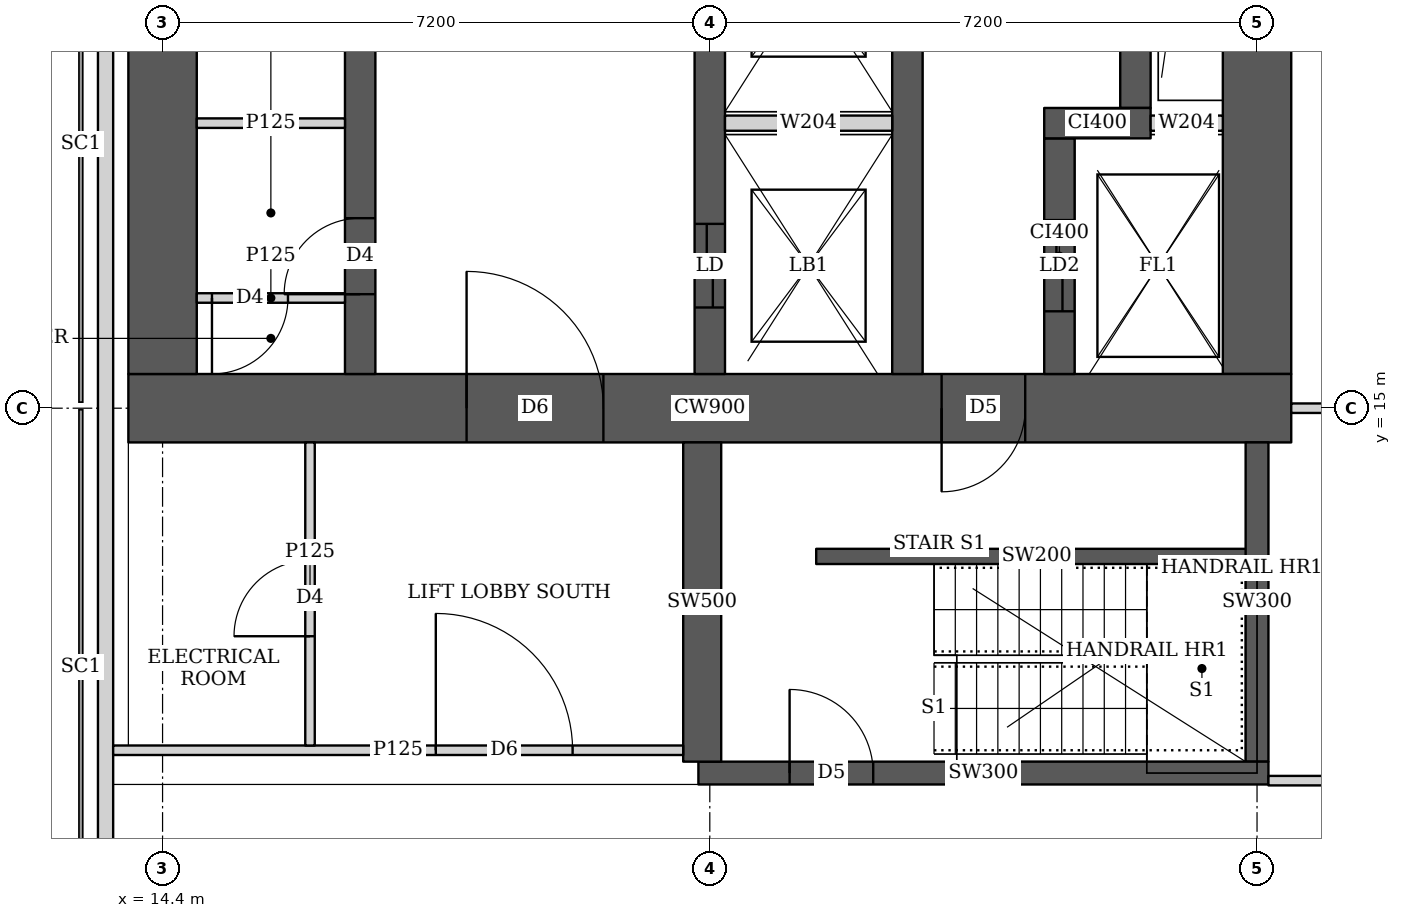
"""IFC4 building model, lengths in metres.
Left out: names, types, materials, properties, quantities, classifications, styles, units other than length and angle.
Written with IfcOpenShell. Run it as: python <this file> out.ifc"""

import sys

from ifc_helpers import new_model, si_unit, direction, frame, frame_2d, origin, place, context, subcontext, project, spatial, rectangle, extrude, element, fill, save


model = new_model("IFC4")
c1 = context("Model", 3, precision=1e-05, world=origin(), true_north=direction((0.0, 1.0)))
c2 = subcontext(c1, "Body", "Model", "MODEL_VIEW")
j1 = project(units=[si_unit("LENGTHUNIT", "METRE"), si_unit("PLANEANGLEUNIT", "RADIAN")], contexts=[c1])
p1 = place(None, origin())
s1 = spatial("IfcSite", under=j1, at=p1, CompositionType="ELEMENT")
p2 = place(p1, origin())
s2 = spatial("IfcBuilding", under=s1, at=p2, CompositionType="ELEMENT")
p3 = place(p2, frame((0.0, 0.0, 270.35)))
s3 = spatial("IfcBuildingStorey", under=s2, at=p3, CompositionType="ELEMENT", Elevation=270.35)
p4 = place(p3, frame((13.95, 15.0, 0.0), z_axis=(0.0, 0.0, 1.0), x_axis=(1.0, 0.0, 0.0)))
e1 = element("IfcWall", 1, at=p4, inside=s3, PredefinedType="SHEAR", context=c2, shape_type="SweptSolid", body=[
    extrude(rectangle(XDim=15.3, YDim=0.9, at=frame_2d((7.65, 0.0))), origin(), (0.0, 0.0, 1.0), 3.75),
])
p5 = place(p4, frame((4.45, 0.0, 0.0)))
e2 = element("IfcOpeningElement", 2, at=p5, cuts=e1, PredefinedType="OPENING", context=c2, shape_type="SweptSolid", body=[
    extrude(rectangle(XDim=1.8, YDim=2.1, at=frame_2d((0.9, 1.05))), frame((0.0, 0.46, 0.0), z_axis=(0.0, -1.0, 0.0), x_axis=(1.0, 0.0, 0.0)), (0.0, 0.0, 1.0), 0.92),
])
p6 = place(p4, frame((10.7, 0.0, 0.0)))
e3 = element("IfcOpeningElement", 3, at=p6, cuts=e1, PredefinedType="OPENING", context=c2, shape_type="SweptSolid", body=[
    extrude(rectangle(XDim=1.1, YDim=2.1, at=frame_2d((0.55, 1.05))), frame((0.0, 0.46, 0.0), z_axis=(0.0, -1.0, 0.0), x_axis=(1.0, 0.0, 0.0)), (0.0, 0.0, 1.0), 0.92),
])
for number, where, z_axis, x_axis in (
    (4, (14.4, 15.45, 0.0), (0.0, 0.0, 1.0), (0.0, 1.0, 0.0)),
    (5, (28.8, 15.45, 0.0), (0.0, 0.0, 1.0), (0.0, 1.0, 0.0)),
):
    element("IfcWall", number, at=place(p3, frame(where, z_axis=z_axis, x_axis=x_axis)), inside=s3, PredefinedType="SHEAR", context=c2, shape_type="SweptSolid", body=[
        extrude(rectangle(XDim=14.1, YDim=0.9, at=frame_2d((7.05, 0.0))), origin(), (0.0, 0.0, 1.0), 3.75),
    ])
p7 = place(p3, frame((17.0, 15.45, 0.0), z_axis=(0.0, 0.0, 1.0), x_axis=(0.0, 1.0, 0.0)))
e6 = element("IfcWall", 6, at=p7, inside=s3, PredefinedType="SHEAR", context=c2, shape_type="SweptSolid", body=[
    extrude(rectangle(XDim=14.1, YDim=0.4, at=frame_2d((7.05, 0.0))), origin(), (0.0, 0.0, 1.0), 3.75),
])
p8 = place(p7, frame((1.05, 0.0, 0.0)))
e7 = element("IfcOpeningElement", 7, at=p8, cuts=e6, PredefinedType="OPENING", context=c2, shape_type="SweptSolid", body=[
    extrude(rectangle(XDim=1.0, YDim=2.1, at=frame_2d((0.5, 1.05))), frame((0.0, 0.21, 0.0), z_axis=(0.0, -1.0, 0.0), x_axis=(1.0, 0.0, 0.0)), (0.0, 0.0, 1.0), 0.42),
])
p9 = place(p7, frame((4.675, 0.0, 0.0)))
e8 = element("IfcOpeningElement", 8, at=p9, cuts=e6, PredefinedType="OPENING", context=c2, shape_type="SweptSolid", body=[
    extrude(rectangle(XDim=1.0, YDim=2.1, at=frame_2d((0.5, 1.05))), frame((0.0, 0.21, 0.0), z_axis=(0.0, -1.0, 0.0), x_axis=(1.0, 0.0, 0.0)), (0.0, 0.0, 1.0), 0.42),
])
p10 = place(p7, frame((8.425, 0.0, 0.0)))
e9 = element("IfcOpeningElement", 9, at=p10, cuts=e6, PredefinedType="OPENING", context=c2, shape_type="SweptSolid", body=[
    extrude(rectangle(XDim=1.0, YDim=2.1, at=frame_2d((0.5, 1.05))), frame((0.0, 0.21, 0.0), z_axis=(0.0, -1.0, 0.0), x_axis=(1.0, 0.0, 0.0)), (0.0, 0.0, 1.0), 0.42),
])
p11 = place(p7, frame((12.175, 0.0, 0.0)))
e10 = element("IfcOpeningElement", 10, at=p11, cuts=e6, PredefinedType="OPENING", context=c2, shape_type="SweptSolid", body=[
    extrude(rectangle(XDim=1.0, YDim=2.1, at=frame_2d((0.5, 1.05))), frame((0.0, 0.21, 0.0), z_axis=(0.0, -1.0, 0.0), x_axis=(1.0, 0.0, 0.0)), (0.0, 0.0, 1.0), 0.42),
])
p12 = place(p3, frame((21.6, 15.45, 0.0), z_axis=(0.0, 0.0, 1.0), x_axis=(0.0, 1.0, 0.0)))
e11 = element("IfcWall", 11, at=p12, inside=s3, PredefinedType="SHEAR", context=c2, shape_type="SweptSolid", body=[
    extrude(rectangle(XDim=14.1, YDim=0.4, at=frame_2d((7.05, 0.0))), origin(), (0.0, 0.0, 1.0), 3.75),
])
p13 = place(p12, frame((0.875, 0.0, 0.0)))
e12 = element("IfcOpeningElement", 12, at=p13, cuts=e11, PredefinedType="OPENING", context=c2, shape_type="SweptSolid", body=[
    extrude(rectangle(XDim=1.1, YDim=2.1, at=frame_2d((0.55, 1.05))), frame((0.0, 0.21, 0.0), z_axis=(0.0, -1.0, 0.0), x_axis=(1.0, 0.0, 0.0)), (0.0, 0.0, 1.0), 0.42),
])
p14 = place(p12, frame((4.625, 0.0, 0.0)))
e13 = element("IfcOpeningElement", 13, at=p14, cuts=e11, PredefinedType="OPENING", context=c2, shape_type="SweptSolid", body=[
    extrude(rectangle(XDim=1.1, YDim=2.1, at=frame_2d((0.55, 1.05))), frame((0.0, 0.21, 0.0), z_axis=(0.0, -1.0, 0.0), x_axis=(1.0, 0.0, 0.0)), (0.0, 0.0, 1.0), 0.42),
])
p15 = place(p12, frame((8.375, 0.0, 0.0)))
e14 = element("IfcOpeningElement", 14, at=p15, cuts=e11, PredefinedType="OPENING", context=c2, shape_type="SweptSolid", body=[
    extrude(rectangle(XDim=1.1, YDim=2.1, at=frame_2d((0.55, 1.05))), frame((0.0, 0.21, 0.0), z_axis=(0.0, -1.0, 0.0), x_axis=(1.0, 0.0, 0.0)), (0.0, 0.0, 1.0), 0.42),
])
p16 = place(p12, frame((12.125, 0.0, 0.0)))
e15 = element("IfcOpeningElement", 15, at=p16, cuts=e11, PredefinedType="OPENING", context=c2, shape_type="SweptSolid", body=[
    extrude(rectangle(XDim=1.1, YDim=2.1, at=frame_2d((0.55, 1.05))), frame((0.0, 0.21, 0.0), z_axis=(0.0, -1.0, 0.0), x_axis=(1.0, 0.0, 0.0)), (0.0, 0.0, 1.0), 0.42),
])
p17 = place(p3, frame((24.2, 15.45, 0.0), z_axis=(0.0, 0.0, 1.0), x_axis=(0.0, 1.0, 0.0)))
e16 = element("IfcWall", 16, at=p17, inside=s3, PredefinedType="SHEAR", context=c2, shape_type="SweptSolid", body=[
    extrude(rectangle(XDim=14.1, YDim=0.4, at=frame_2d((7.05, 0.0))), origin(), (0.0, 0.0, 1.0), 3.75),
])
p18 = place(p3, frame((26.2, 15.45, 0.0), z_axis=(0.0, 0.0, 1.0), x_axis=(0.0, 1.0, 0.0)))
e17 = element("IfcWall", 17, at=p18, inside=s3, PredefinedType="SHEAR", context=c2, shape_type="SweptSolid", body=[
    extrude(rectangle(XDim=3.1, YDim=0.4, at=frame_2d((1.55, 0.0))), origin(), (0.0, 0.0, 1.0), 3.75),
])
p19 = place(p18, frame((0.825, 0.0, 0.0)))
e18 = element("IfcOpeningElement", 18, at=p19, cuts=e17, PredefinedType="OPENING", context=c2, shape_type="SweptSolid", body=[
    extrude(rectangle(XDim=1.2, YDim=2.1, at=frame_2d((0.6, 1.05))), frame((0.0, 0.21, 0.0), z_axis=(0.0, -1.0, 0.0), x_axis=(1.0, 0.0, 0.0)), (0.0, 0.0, 1.0), 0.42),
])
p20 = place(p3, frame((26.0, 18.75, 0.0), z_axis=(0.0, 0.0, 1.0), x_axis=(1.0, 0.0, 0.0)))
e19 = element("IfcWall", 19, at=p20, inside=s3, PredefinedType="SHEAR", context=c2, shape_type="SweptSolid", body=[
    extrude(rectangle(XDim=1.4, YDim=0.4, at=frame_2d((0.7, 0.0))), origin(), (0.0, 0.0, 1.0), 3.75),
])
p21 = place(p3, frame((27.2, 18.95, 0.0), z_axis=(0.0, 0.0, 1.0), x_axis=(0.0, 1.0, 0.0)))
e20 = element("IfcWall", 20, at=p21, inside=s3, PredefinedType="SHEAR", context=c2, shape_type="SweptSolid", body=[
    extrude(rectangle(XDim=7.1, YDim=0.4, at=frame_2d((3.55, 0.0))), origin(), (0.0, 0.0, 1.0), 3.75),
])
p22 = place(p3, frame((21.45, 10.2, 0.0), z_axis=(0.0, 0.0, 1.0), x_axis=(1.0, 0.0, 0.0)))
e21 = element("IfcWall", 21, at=p22, inside=s3, PredefinedType="SHEAR", context=c2, shape_type="SweptSolid", body=[
    extrude(rectangle(XDim=7.5, YDim=0.3, at=frame_2d((3.75, 0.0))), origin(), (0.0, 0.0, 1.0), 3.75),
])
p23 = place(p22, frame((1.2, 0.0, 0.0)))
e22 = element("IfcOpeningElement", 22, at=p23, cuts=e21, PredefinedType="OPENING", context=c2, shape_type="SweptSolid", body=[
    extrude(rectangle(XDim=1.1, YDim=2.1, at=frame_2d((0.55, 1.05))), frame((0.0, 0.16, 0.0), z_axis=(0.0, -1.0, 0.0), x_axis=(1.0, 0.0, 0.0)), (0.0, 0.0, 1.0), 0.32),
])
p24 = place(p3, frame((21.5, 10.35, 0.0), z_axis=(0.0, 0.0, 1.0), x_axis=(0.0, 1.0, 0.0)))
e23 = element("IfcWall", 23, at=p24, inside=s3, PredefinedType="SHEAR", context=c2, shape_type="SweptSolid", body=[
    extrude(rectangle(XDim=4.2, YDim=0.5, at=frame_2d((2.1, 0.0))), origin(), (0.0, 0.0, 1.0), 3.75),
])
p25 = place(p3, frame((28.8, 10.35, 0.0), z_axis=(0.0, 0.0, 1.0), x_axis=(0.0, 1.0, 0.0)))
e24 = element("IfcWall", 24, at=p25, inside=s3, PredefinedType="SHEAR", context=c2, shape_type="SweptSolid", body=[
    extrude(rectangle(XDim=4.2, YDim=0.3, at=frame_2d((2.1, 0.0))), origin(), (0.0, 0.0, 1.0), 3.75),
])
p26 = place(p3, frame((13.65, 43.037, 0.0), z_axis=(0.0, 0.0, 1.0), x_axis=(0.0, -1.0, 0.0)))
e25 = element("IfcWall", 25, at=p26, inside=s3, PredefinedType="SOLIDWALL", context=c2, shape_type="SweptSolid", body=[
    extrude(rectangle(XDim=35.374, YDim=0.2, at=frame_2d((17.687, 0.0))), origin(), (0.0, 0.0, 1.0), 3.5),
])
p27 = place(p26, frame((1.959, 0.0, 0.9)))
e26 = element("IfcOpeningElement", 26, at=p27, cuts=e25, PredefinedType="OPENING", context=c2, shape_type="SweptSolid", body=[
    extrude(rectangle(XDim=1.8, YDim=1.5, at=frame_2d((0.9, 0.75))), frame((0.0, 0.11, 0.0), z_axis=(0.0, -1.0, 0.0), x_axis=(1.0, 0.0, 0.0)), (0.0, 0.0, 1.0), 0.22),
])
p28 = place(p3, frame((13.75, 10.5, 0.0), z_axis=(0.0, 0.0, 1.0), x_axis=(1.0, 0.0, 0.0)))
e27 = element("IfcWall", 27, at=p28, inside=s3, PredefinedType="PARTITIONING", context=c2, shape_type="SweptSolid", body=[
    extrude(rectangle(XDim=7.5, YDim=0.125, at=frame_2d((3.75, 0.0))), origin(), (0.0, 0.0, 1.0), 3.5),
])
p29 = place(p28, frame((4.245, 0.0, 0.0)))
e28 = element("IfcOpeningElement", 28, at=p29, cuts=e27, PredefinedType="OPENING", context=c2, shape_type="SweptSolid", body=[
    extrude(rectangle(XDim=1.8, YDim=2.1, at=frame_2d((0.9, 1.05))), frame((0.0, 0.073, 0.0), z_axis=(0.0, -1.0, 0.0), x_axis=(1.0, 0.0, 0.0)), (0.0, 0.0, 1.0), 0.145),
])
p30 = place(p3, frame((16.34, 10.562, 0.0), z_axis=(0.0, 0.0, 1.0), x_axis=(0.0, 1.0, 0.0)))
e29 = element("IfcWall", 29, at=p30, inside=s3, PredefinedType="PARTITIONING", context=c2, shape_type="SweptSolid", body=[
    extrude(rectangle(XDim=3.988, YDim=0.125, at=frame_2d((1.994, 0.0))), origin(), (0.0, 0.0, 1.0), 3.5),
])
p31 = place(p30, frame((1.438, 0.0, 0.0)))
e30 = element("IfcOpeningElement", 30, at=p31, cuts=e29, PredefinedType="OPENING", context=c2, shape_type="SweptSolid", body=[
    extrude(rectangle(XDim=1.0, YDim=2.1, at=frame_2d((0.5, 1.05))), frame((0.0, 0.073, 0.0), z_axis=(0.0, -1.0, 0.0), x_axis=(1.0, 0.0, 0.0)), (0.0, 0.0, 1.0), 0.145),
])
p32 = place(p3, frame((28.95, 10.1, 0.0), z_axis=(0.0, 0.0, 1.0), x_axis=(1.0, 0.0, 0.0)))
e31 = element("IfcWall", 31, at=p32, inside=s3, PredefinedType="PARTITIONING", context=c2, shape_type="SweptSolid", body=[
    extrude(rectangle(XDim=9.188, YDim=0.125, at=frame_2d((4.594, 0.0))), origin(), (0.0, 0.0, 1.0), 3.5),
])
p33 = place(p3, frame((29.25, 15.0, 0.0), z_axis=(0.0, 0.0, 1.0), x_axis=(1.0, 0.0, 0.0)))
e32 = element("IfcWall", 32, at=p33, inside=s3, PredefinedType="PARTITIONING", context=c2, shape_type="SweptSolid", body=[
    extrude(rectangle(XDim=6.049, YDim=0.125, at=frame_2d((3.024, 0.0))), origin(), (0.0, 0.0, 1.0), 3.5),
])
p34 = place(p3, frame((14.85, 16.45, 0.0), z_axis=(0.0, 0.0, 1.0), x_axis=(1.0, 0.0, 0.0)))
e33 = element("IfcWall", 33, at=p34, inside=s3, PredefinedType="PARTITIONING", context=c2, shape_type="SweptSolid", body=[
    extrude(rectangle(XDim=1.95, YDim=0.125, at=frame_2d((0.975, 0.0))), origin(), (0.0, 0.0, 1.0), 3.5),
])
p35 = place(p34, frame((0.2, 0.0, 0.0)))
e34 = element("IfcOpeningElement", 34, at=p35, cuts=e33, PredefinedType="OPENING", context=c2, shape_type="SweptSolid", body=[
    extrude(rectangle(XDim=1.0, YDim=2.1, at=frame_2d((0.5, 1.05))), frame((0.0, 0.073, 0.0), z_axis=(0.0, -1.0, 0.0), x_axis=(1.0, 0.0, 0.0)), (0.0, 0.0, 1.0), 0.145),
])
p36 = place(p3, frame((14.85, 18.75, 0.0), z_axis=(0.0, 0.0, 1.0), x_axis=(1.0, 0.0, 0.0)))
e35 = element("IfcWall", 35, at=p36, inside=s3, PredefinedType="PARTITIONING", context=c2, shape_type="SweptSolid", body=[
    extrude(rectangle(XDim=1.95, YDim=0.125, at=frame_2d((0.975, 0.0))), origin(), (0.0, 0.0, 1.0), 3.5),
])
p37 = place(p3, frame((23.0, 13.05, 0.0), z_axis=(0.0, 0.0, 1.0), x_axis=(1.0, 0.0, 0.0)))
e36 = element("IfcWall", 36, at=p37, inside=s3, PredefinedType="SHEAR", context=c2, shape_type="SweptSolid", body=[
    extrude(rectangle(XDim=5.8, YDim=0.2, at=frame_2d((2.9, 0.0))), origin(), (0.0, 0.0, 1.0), 3.75),
])
p38 = place(p3, frame((21.8, 18.75, 0.0), z_axis=(0.0, 0.0, 1.0), x_axis=(1.0, 0.0, 0.0)))
e37 = element("IfcWall", 37, at=p38, inside=s3, PredefinedType="SOLIDWALL", context=c2, shape_type="SweptSolid", body=[
    extrude(rectangle(XDim=2.2, YDim=0.2, at=frame_2d((1.1, 0.0))), origin(), (0.0, 0.0, 1.0), 3.5),
])
p39 = place(p3, frame((27.4, 18.75, 0.0), z_axis=(0.0, 0.0, 1.0), x_axis=(1.0, 0.0, 0.0)))
e38 = element("IfcWall", 38, at=p39, inside=s3, PredefinedType="SOLIDWALL", context=c2, shape_type="SweptSolid", body=[
    extrude(rectangle(XDim=0.95, YDim=0.2, at=frame_2d((0.475, 0.0))), origin(), (0.0, 0.0, 1.0), 3.5),
])
p40 = place(p31, origin())
e39 = element("IfcDoor", 39, at=p40, inside=s3, OperationType="SINGLE_SWING_LEFT", PredefinedType="DOOR", context=c2, shape_type="SweptSolid", body=[
    extrude(rectangle(XDim=1.0, YDim=2.1, at=frame_2d((0.5, 1.05))), frame((0.0, 0.025, 0.0), z_axis=(0.0, -1.0, 0.0), x_axis=(1.0, 0.0, 0.0)), (0.0, 0.0, 1.0), 0.05),
])
fill(e30, e39)
p41 = place(p29, origin())
e40 = element("IfcDoor", 40, at=p41, inside=s3, OperationType="DOUBLE_DOOR_SINGLE_SWING", PredefinedType="DOOR", context=c2, shape_type="SweptSolid", body=[
    extrude(rectangle(XDim=1.8, YDim=2.1, at=frame_2d((0.9, 1.05))), frame((0.0, 0.025, 0.0), z_axis=(0.0, -1.0, 0.0), x_axis=(1.0, 0.0, 0.0)), (0.0, 0.0, 1.0), 0.05),
])
fill(e28, e40)
p42 = place(p35, origin())
e41 = element("IfcDoor", 41, at=p42, inside=s3, OperationType="SINGLE_SWING_RIGHT", PredefinedType="DOOR", context=c2, shape_type="SweptSolid", body=[
    extrude(rectangle(XDim=1.0, YDim=2.1, at=frame_2d((0.5, 1.05))), frame((0.0, 0.025, 0.0), z_axis=(0.0, -1.0, 0.0), x_axis=(1.0, 0.0, 0.0)), (0.0, 0.0, 1.0), 0.05),
])
fill(e34, e41)
p43 = place(p8, origin())
e42 = element("IfcDoor", 42, at=p43, inside=s3, OperationType="SINGLE_SWING_LEFT", PredefinedType="DOOR", context=c2, shape_type="SweptSolid", body=[
    extrude(rectangle(XDim=1.0, YDim=2.1, at=frame_2d((0.5, 1.05))), frame((0.0, 0.025, 0.0), z_axis=(0.0, -1.0, 0.0), x_axis=(1.0, 0.0, 0.0)), (0.0, 0.0, 1.0), 0.05),
])
fill(e7, e42)
p44 = place(p5, origin())
e43 = element("IfcDoor", 43, at=p44, inside=s3, OperationType="DOUBLE_DOOR_SINGLE_SWING", PredefinedType="DOOR", context=c2, shape_type="SweptSolid", body=[
    extrude(rectangle(XDim=1.8, YDim=2.1, at=frame_2d((0.9, 1.05))), frame((0.0, 0.025, 0.0), z_axis=(0.0, -1.0, 0.0), x_axis=(1.0, 0.0, 0.0)), (0.0, 0.0, 1.0), 0.05),
])
fill(e2, e43)
p45 = place(p6, origin())
e44 = element("IfcDoor", 44, at=p45, inside=s3, OperationType="SINGLE_SWING_RIGHT", PredefinedType="DOOR", context=c2, shape_type="SweptSolid", body=[
    extrude(rectangle(XDim=1.1, YDim=2.1, at=frame_2d((0.55, 1.05))), frame((0.0, 0.025, 0.0), z_axis=(0.0, -1.0, 0.0), x_axis=(1.0, 0.0, 0.0)), (0.0, 0.0, 1.0), 0.05),
])
fill(e3, e44)
p46 = place(p19, origin())
e45 = element("IfcDoor", 45, at=p46, inside=s3, OperationType="DOUBLE_DOOR_SLIDING", PredefinedType="DOOR", context=c2, shape_type="SweptSolid", body=[
    extrude(rectangle(XDim=1.2, YDim=2.1, at=frame_2d((0.6, 1.05))), frame((0.0, 0.025, 0.0), z_axis=(0.0, -1.0, 0.0), x_axis=(1.0, 0.0, 0.0)), (0.0, 0.0, 1.0), 0.05),
])
fill(e18, e45)
p47 = place(p13, origin())
e46 = element("IfcDoor", 46, at=p47, inside=s3, OperationType="DOUBLE_DOOR_SLIDING", PredefinedType="DOOR", context=c2, shape_type="SweptSolid", body=[
    extrude(rectangle(XDim=1.1, YDim=2.1, at=frame_2d((0.55, 1.05))), frame((0.0, 0.025, 0.0), z_axis=(0.0, -1.0, 0.0), x_axis=(1.0, 0.0, 0.0)), (0.0, 0.0, 1.0), 0.05),
])
fill(e12, e46)
p48 = place(p23, origin())
e47 = element("IfcDoor", 47, at=p48, inside=s3, OperationType="SINGLE_SWING_LEFT", PredefinedType="DOOR", context=c2, shape_type="SweptSolid", body=[
    extrude(rectangle(XDim=1.1, YDim=2.1, at=frame_2d((0.55, 1.05))), frame((0.0, 0.025, 0.0), z_axis=(0.0, -1.0, 0.0), x_axis=(1.0, 0.0, 0.0)), (0.0, 0.0, 1.0), 0.05),
])
fill(e22, e47)
save(model, sys.argv[1])
